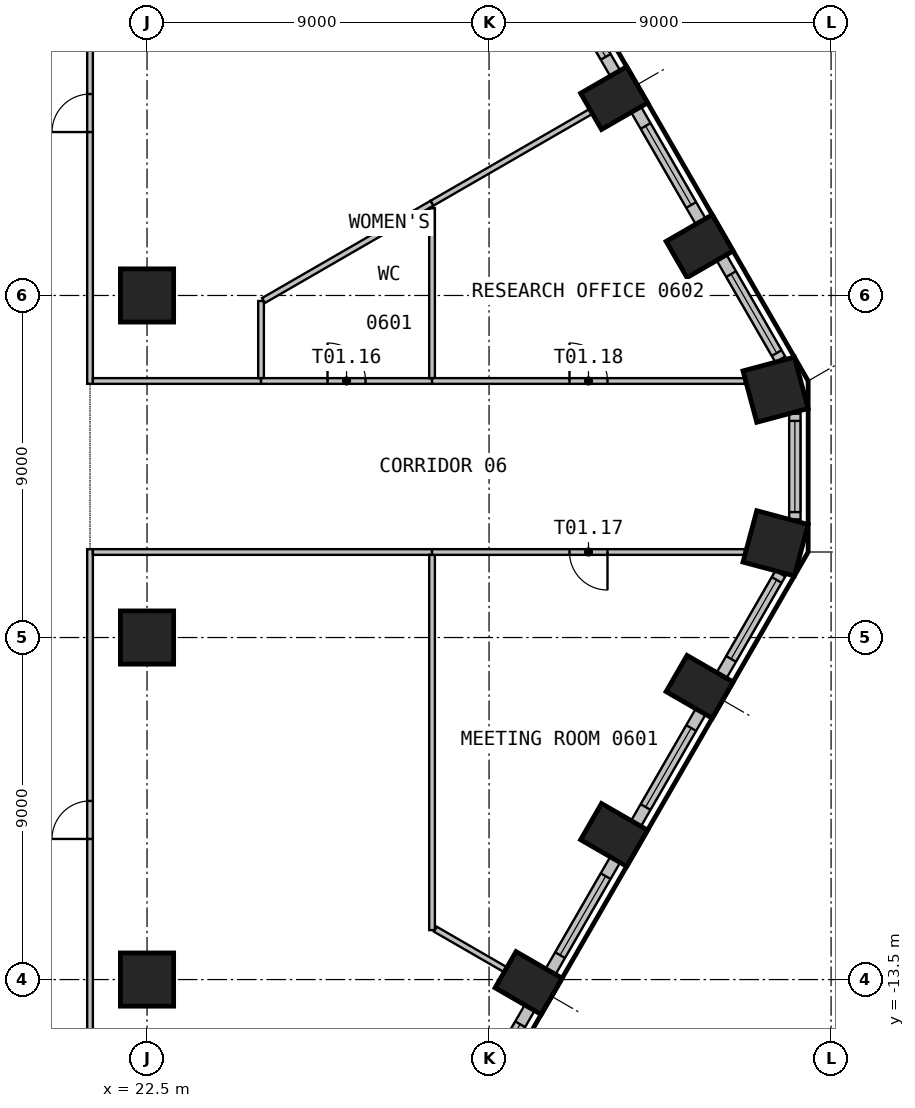
"""IFC4 building model, lengths in metres.
Left out: names, types, materials, properties, quantities, classifications, styles, units other than length and angle.
Written with IfcOpenShell. Run it as: python <this file> out.ifc"""

import sys

from ifc_helpers import new_model, si_unit, direction, frame, frame_2d, origin, origin_2d, place, context, subcontext, project, spatial, rectangle, circle, extrude, element, fill, save


model = new_model("IFC4")
c1 = context("Model", 3, precision=1e-05, world=origin(), true_north=direction((0.0, 1.0)))
c2 = subcontext(c1, "Body", "Model", "MODEL_VIEW")
j1 = project(units=[si_unit("LENGTHUNIT", "METRE"), si_unit("PLANEANGLEUNIT", "RADIAN")], contexts=[c1])
p1 = place(None, origin())
s1 = spatial("IfcSite", under=j1, at=p1, CompositionType="ELEMENT")
p2 = place(p1, origin())
s2 = spatial("IfcBuilding", under=s1, at=p2, CompositionType="ELEMENT")
p3 = place(p2, frame((0.0, 0.0, 30.0)))
s3 = spatial("IfcBuildingStorey", under=s2, at=p3, CompositionType="ELEMENT", Elevation=30.0)
for number, where, z_axis, x_axis in (
    (1, (32.541, -13.591, 0.0), (0.0, 0.0, 1.0), (0.5, 0.866, 0.0)),
    (2, (34.791, -9.694, 0.0), (0.0, 0.0, 1.0), (0.5, 0.866, 0.0)),
    (3, (37.041, -5.797, 0.0), (0.0, 0.0, 1.0), (0.5, 0.866, 0.0)),
):
    element("IfcColumn", number, at=place(p3, frame(where, z_axis=z_axis, x_axis=x_axis)), inside=s3, PredefinedType="COLUMN", context=c2, shape_type="SweptSolid", body=[
        extrude(rectangle(XDim=1.1, YDim=1.4, at=origin_2d()), origin(), (0.0, 0.0, 1.0), 3.525),
    ])
for number, where, z_axis, x_axis in (
    (4, (39.04, -2.02, 0.0), (0.0, 0.0, 1.0), (0.259, 0.966, 0.0)),
    (5, (39.04, 2.02, 0.0), (0.0, 0.0, 1.0), (-0.259, 0.966, 0.0)),
):
    element("IfcColumn", number, at=place(p3, frame(where, z_axis=z_axis, x_axis=x_axis)), inside=s3, PredefinedType="COLUMN", context=c2, shape_type="SweptSolid", body=[
        extrude(rectangle(XDim=1.4, YDim=1.4, at=origin_2d()), origin(), (0.0, 0.0, 1.0), 3.525),
    ])
for number, where, z_axis, x_axis in (
    (6, (37.041, 5.797, 0.0), (0.0, 0.0, 1.0), (-0.5, 0.866, 0.0)),
    (7, (34.791, 9.694, 0.0), (0.0, 0.0, 1.0), (-0.5, 0.866, 0.0)),
):
    element("IfcColumn", number, at=place(p3, frame(where, z_axis=z_axis, x_axis=x_axis)), inside=s3, PredefinedType="COLUMN", context=c2, shape_type="SweptSolid", body=[
        extrude(rectangle(XDim=1.1, YDim=1.4, at=origin_2d()), origin(), (0.0, 0.0, 1.0), 3.525),
    ])
for number, where, z_axis, x_axis in (
    (8, (22.5, -13.5, 0.0), (0.0, 0.0, 1.0), (1.0, 0.0, 0.0)),
    (9, (22.5, -4.5, 0.0), (0.0, 0.0, 1.0), (1.0, 0.0, 0.0)),
    (10, (22.5, 4.5, 0.0), (0.0, 0.0, 1.0), (1.0, 0.0, 0.0)),
):
    element("IfcColumn", number, at=place(p3, frame(where, z_axis=z_axis, x_axis=x_axis)), inside=s3, PredefinedType="COLUMN", context=c2, shape_type="SweptSolid", body=[
        extrude(circle(Radius=0.7, at=origin_2d()), origin(), (0.0, 0.0, 1.0), 3.525),
    ])
p4 = place(p3, frame((30.869, -17.187, 0.0), z_axis=(0.0, 0.0, 1.0), x_axis=(0.499993955907, 0.866028893315, 0.0)))
e11 = element("IfcWall", 11, at=p4, inside=s3, PredefinedType="SOLIDWALL", context=c2, shape_type="SweptSolid", body=[
    extrude(rectangle(XDim=3.399, YDim=0.3, at=frame_2d((1.699, 0.0))), origin(), (0.0, 0.0, 1.0), 3.525),
])
p5 = place(p4, frame((0.5, 0.0, 0.9)))
e12 = element("IfcOpeningElement", 12, at=p5, cuts=e11, PredefinedType="OPENING", context=c2, shape_type="SweptSolid", body=[
    extrude(rectangle(XDim=2.4, YDim=2.1, at=frame_2d((1.2, 1.05))), frame((0.0, 0.16, 0.0), z_axis=(0.0, -1.0, 0.0), x_axis=(1.0, 0.0, 0.0)), (0.0, 0.0, 1.0), 0.32),
])
p6 = place(p3, frame((33.119, -13.29, 0.0), z_axis=(0.0, 0.0, 1.0), x_axis=(0.499993955907, 0.866028893315, 0.0)))
e13 = element("IfcWall", 13, at=p6, inside=s3, PredefinedType="SOLIDWALL", context=c2, shape_type="SweptSolid", body=[
    extrude(rectangle(XDim=3.399, YDim=0.3, at=frame_2d((1.699, 0.0))), origin(), (0.0, 0.0, 1.0), 3.525),
])
p7 = place(p6, frame((0.5, 0.0, 0.9)))
e14 = element("IfcOpeningElement", 14, at=p7, cuts=e13, PredefinedType="OPENING", context=c2, shape_type="SweptSolid", body=[
    extrude(rectangle(XDim=2.4, YDim=2.1, at=frame_2d((1.2, 1.05))), frame((0.0, 0.16, 0.0), z_axis=(0.0, -1.0, 0.0), x_axis=(1.0, 0.0, 0.0)), (0.0, 0.0, 1.0), 0.32),
])
p8 = place(p3, frame((35.369, -9.393, 0.0), z_axis=(0.0, 0.0, 1.0), x_axis=(0.499993955907, 0.866028893315, 0.0)))
e15 = element("IfcWall", 15, at=p8, inside=s3, PredefinedType="SOLIDWALL", context=c2, shape_type="SweptSolid", body=[
    extrude(rectangle(XDim=3.399, YDim=0.3, at=frame_2d((1.699, 0.0))), origin(), (0.0, 0.0, 1.0), 3.525),
])
p9 = place(p8, frame((0.5, 0.0, 0.9)))
e16 = element("IfcOpeningElement", 16, at=p9, cuts=e15, PredefinedType="OPENING", context=c2, shape_type="SweptSolid", body=[
    extrude(rectangle(XDim=2.4, YDim=2.1, at=frame_2d((1.2, 1.05))), frame((0.0, 0.16, 0.0), z_axis=(0.0, -1.0, 0.0), x_axis=(1.0, 0.0, 0.0)), (0.0, 0.0, 1.0), 0.32),
])
p10 = place(p3, frame((37.619, -5.495, 0.0), z_axis=(0.0, 0.0, 1.0), x_axis=(0.49997090907, 0.866042198789, 0.0)))
e17 = element("IfcWall", 17, at=p10, inside=s3, PredefinedType="SOLIDWALL", context=c2, shape_type="SweptSolid", body=[
    extrude(rectangle(XDim=3.091, YDim=0.3, at=frame_2d((1.545, 0.0))), origin(), (0.0, 0.0, 1.0), 3.525),
])
p11 = place(p10, frame((0.5, 0.0, 0.9)))
e18 = element("IfcOpeningElement", 18, at=p11, cuts=e17, PredefinedType="OPENING", context=c2, shape_type="SweptSolid", body=[
    extrude(rectangle(XDim=2.4, YDim=2.1, at=frame_2d((1.2, 1.05))), frame((0.0, 0.16, 0.0), z_axis=(0.0, -1.0, 0.0), x_axis=(1.0, 0.0, 0.0)), (0.0, 0.0, 1.0), 0.32),
])
p12 = place(p3, frame((39.547, -1.391, 0.0), z_axis=(0.0, 0.0, 1.0), x_axis=(0.0, 1.0, 0.0)))
e19 = element("IfcWall", 19, at=p12, inside=s3, PredefinedType="SOLIDWALL", context=c2, shape_type="SweptSolid", body=[
    extrude(rectangle(XDim=2.782, YDim=0.3, at=frame_2d((1.391, 0.0))), origin(), (0.0, 0.0, 1.0), 3.525),
])
p13 = place(p12, frame((0.191, 0.0, 0.9)))
e20 = element("IfcOpeningElement", 20, at=p13, cuts=e19, PredefinedType="OPENING", context=c2, shape_type="SweptSolid", body=[
    extrude(rectangle(XDim=2.4, YDim=2.1, at=frame_2d((1.2, 1.05))), frame((0.0, 0.16, 0.0), z_axis=(0.0, -1.0, 0.0), x_axis=(1.0, 0.0, 0.0)), (0.0, 0.0, 1.0), 0.32),
])
p14 = place(p3, frame((39.165, 2.819, 0.0), z_axis=(0.0, 0.0, 1.0), x_axis=(-0.49997090907, 0.866042198789, 0.0)))
e21 = element("IfcWall", 21, at=p14, inside=s3, PredefinedType="SOLIDWALL", context=c2, shape_type="SweptSolid", body=[
    extrude(rectangle(XDim=3.091, YDim=0.3, at=frame_2d((1.545, 0.0))), origin(), (0.0, 0.0, 1.0), 3.525),
])
p15 = place(p14, frame((0.191, 0.0, 0.9)))
e22 = element("IfcOpeningElement", 22, at=p15, cuts=e21, PredefinedType="OPENING", context=c2, shape_type="SweptSolid", body=[
    extrude(rectangle(XDim=2.4, YDim=2.1, at=frame_2d((1.2, 1.05))), frame((0.0, 0.16, 0.0), z_axis=(0.0, -1.0, 0.0), x_axis=(1.0, 0.0, 0.0)), (0.0, 0.0, 1.0), 0.32),
])
p16 = place(p3, frame((37.069, 6.449, 0.0), z_axis=(0.0, 0.0, 1.0), x_axis=(-0.499993955907, 0.866028893315, 0.0)))
e23 = element("IfcWall", 23, at=p16, inside=s3, PredefinedType="SOLIDWALL", context=c2, shape_type="SweptSolid", body=[
    extrude(rectangle(XDim=3.399, YDim=0.3, at=frame_2d((1.699, 0.0))), origin(), (0.0, 0.0, 1.0), 3.525),
])
p17 = place(p16, frame((0.5, 0.0, 0.9)))
e24 = element("IfcOpeningElement", 24, at=p17, cuts=e23, PredefinedType="OPENING", context=c2, shape_type="SweptSolid", body=[
    extrude(rectangle(XDim=2.4, YDim=2.1, at=frame_2d((1.2, 1.05))), frame((0.0, 0.16, 0.0), z_axis=(0.0, -1.0, 0.0), x_axis=(1.0, 0.0, 0.0)), (0.0, 0.0, 1.0), 0.32),
])
p18 = place(p3, frame((34.819, 10.346, 0.0), z_axis=(0.0, 0.0, 1.0), x_axis=(-0.499993955907, 0.866028893315, 0.0)))
e25 = element("IfcWall", 25, at=p18, inside=s3, PredefinedType="SOLIDWALL", context=c2, shape_type="SweptSolid", body=[
    extrude(rectangle(XDim=3.399, YDim=0.3, at=frame_2d((1.699, 0.0))), origin(), (0.0, 0.0, 1.0), 3.525),
])
p19 = place(p18, frame((0.5, 0.0, 0.9)))
e26 = element("IfcOpeningElement", 26, at=p19, cuts=e25, PredefinedType="OPENING", context=c2, shape_type="SweptSolid", body=[
    extrude(rectangle(XDim=2.4, YDim=2.1, at=frame_2d((1.2, 1.05))), frame((0.0, 0.16, 0.0), z_axis=(0.0, -1.0, 0.0), x_axis=(1.0, 0.0, 0.0)), (0.0, 0.0, 1.0), 0.32),
])
p20 = place(p3, frame((21.0, -16.425, 0.0), z_axis=(0.0, 0.0, 1.0), x_axis=(0.0, 1.0, 0.0)))
e27 = element("IfcWall", 27, at=p20, inside=s3, PredefinedType="PARTITIONING", context=c2, shape_type="SweptSolid", body=[
    extrude(rectangle(XDim=14.25, YDim=0.15, at=frame_2d((7.125, 0.0))), origin(), (0.0, 0.0, 1.0), 3.525),
])
p21 = place(p20, frame((6.625, 0.0, 0.0)))
e28 = element("IfcOpeningElement", 28, at=p21, cuts=e27, PredefinedType="OPENING", context=c2, shape_type="SweptSolid", body=[
    extrude(rectangle(XDim=1.0, YDim=2.1, at=frame_2d((0.5, 1.05))), frame((0.0, 0.085, 0.0), z_axis=(0.0, -1.0, 0.0), x_axis=(1.0, 0.0, 0.0)), (0.0, 0.0, 1.0), 0.17),
])
p22 = place(p3, frame((30.0, -2.25, 0.0), z_axis=(0.0, 0.0, 1.0), x_axis=(-1.0, 0.0, 0.0)))
e29 = element("IfcWall", 29, at=p22, inside=s3, PredefinedType="PARTITIONING", context=c2, shape_type="SweptSolid", body=[
    extrude(rectangle(XDim=8.925, YDim=0.15, at=frame_2d((4.462, 0.0))), origin(), (0.0, 0.0, 1.0), 3.525),
])
p23 = place(p3, frame((21.0, 2.175, 0.0), z_axis=(0.0, 0.0, 1.0), x_axis=(0.0, 1.0, 0.0)))
e30 = element("IfcWall", 30, at=p23, inside=s3, PredefinedType="PARTITIONING", context=c2, shape_type="SweptSolid", body=[
    extrude(rectangle(XDim=14.25, YDim=0.15, at=frame_2d((7.125, 0.0))), origin(), (0.0, 0.0, 1.0), 3.525),
])
p24 = place(p23, frame((6.625, 0.0, 0.0)))
e31 = element("IfcOpeningElement", 31, at=p24, cuts=e30, PredefinedType="OPENING", context=c2, shape_type="SweptSolid", body=[
    extrude(rectangle(XDim=1.0, YDim=2.1, at=frame_2d((0.5, 1.05))), frame((0.0, 0.085, 0.0), z_axis=(0.0, -1.0, 0.0), x_axis=(1.0, 0.0, 0.0)), (0.0, 0.0, 1.0), 0.17),
])
p25 = place(p3, frame((21.075, 2.25, 0.0), z_axis=(0.0, 0.0, 1.0), x_axis=(1.0, 0.0, 0.0)))
e32 = element("IfcWall", 32, at=p25, inside=s3, PredefinedType="PARTITIONING", context=c2, shape_type="SweptSolid", body=[
    extrude(rectangle(XDim=4.425, YDim=0.15, at=frame_2d((2.212, 0.0))), origin(), (0.0, 0.0, 1.0), 3.525),
])
p26 = place(p3, frame((25.5, 4.355, 0.0), z_axis=(0.0, 0.0, 1.0), x_axis=(0.0, -1.0, 0.0)))
e33 = element("IfcWall", 33, at=p26, inside=s3, PredefinedType="PARTITIONING", context=c2, shape_type="SweptSolid", body=[
    extrude(rectangle(XDim=2.03, YDim=0.15, at=frame_2d((1.015, 0.0))), origin(), (0.0, 0.0, 1.0), 3.525),
])
p27 = place(p3, frame((25.5, 2.25, 0.0), z_axis=(0.0, 0.0, 1.0), x_axis=(1.0, 0.0, 0.0)))
e34 = element("IfcWall", 34, at=p27, inside=s3, PredefinedType="PARTITIONING", context=c2, shape_type="SweptSolid", body=[
    extrude(rectangle(XDim=4.5, YDim=0.15, at=frame_2d((2.25, 0.0))), origin(), (0.0, 0.0, 1.0), 3.525),
])
p28 = place(p27, frame((1.75, 0.0, 0.0)))
e35 = element("IfcOpeningElement", 35, at=p28, cuts=e34, PredefinedType="OPENING", context=c2, shape_type="SweptSolid", body=[
    extrude(rectangle(XDim=1.0, YDim=2.1, at=frame_2d((0.5, 1.05))), frame((0.0, 0.085, 0.0), z_axis=(0.0, -1.0, 0.0), x_axis=(1.0, 0.0, 0.0)), (0.0, 0.0, 1.0), 0.17),
])
p29 = place(p3, frame((30.0, 6.928, 0.0), z_axis=(0.0, 0.0, 1.0), x_axis=(-0.866028396804, -0.499994815902, 0.0)))
e36 = element("IfcWall", 36, at=p29, inside=s3, PredefinedType="PARTITIONING", context=c2, shape_type="SweptSolid", body=[
    extrude(rectangle(XDim=5.121, YDim=0.15, at=frame_2d((2.561, 0.0))), origin(), (0.0, 0.0, 1.0), 3.525),
])
p30 = place(p3, frame((30.0, -2.325, 0.0), z_axis=(0.0, 0.0, 1.0), x_axis=(0.0, -1.0, 0.0)))
e37 = element("IfcWall", 37, at=p30, inside=s3, PredefinedType="PARTITIONING", context=c2, shape_type="SweptSolid", body=[
    extrude(rectangle(XDim=9.874, YDim=0.15, at=frame_2d((4.937, 0.0))), origin(), (0.0, 0.0, 1.0), 3.525),
])
p31 = place(p3, frame((30.087, -12.174, 0.0), z_axis=(0.0, 0.0, 1.0), x_axis=(0.866002883922, -0.500039003518, 0.0)))
e38 = element("IfcWall", 38, at=p31, inside=s3, PredefinedType="PARTITIONING", context=c2, shape_type="SweptSolid", body=[
    extrude(rectangle(XDim=2.114, YDim=0.15, at=frame_2d((1.057, 0.0))), origin(), (0.0, 0.0, 1.0), 3.525),
])
p32 = place(p3, frame((38.233, -2.25, 0.0), z_axis=(0.0, 0.0, 1.0), x_axis=(-1.0, 0.0, 0.0)))
e39 = element("IfcWall", 39, at=p32, inside=s3, PredefinedType="PARTITIONING", context=c2, shape_type="SweptSolid", body=[
    extrude(rectangle(XDim=8.233, YDim=0.15, at=frame_2d((4.116, 0.0))), origin(), (0.0, 0.0, 1.0), 3.525),
])
p33 = place(p32, frame((3.616, 0.0, 0.0)))
e40 = element("IfcOpeningElement", 40, at=p33, cuts=e39, PredefinedType="OPENING", context=c2, shape_type="SweptSolid", body=[
    extrude(rectangle(XDim=1.0, YDim=2.1, at=frame_2d((0.5, 1.05))), frame((0.0, 0.085, 0.0), z_axis=(0.0, -1.0, 0.0), x_axis=(1.0, 0.0, 0.0)), (0.0, 0.0, 1.0), 0.17),
])
p34 = place(p3, frame((30.0, 6.798, 0.0), z_axis=(0.0, 0.0, 1.0), x_axis=(0.0, -1.0, 0.0)))
e41 = element("IfcWall", 41, at=p34, inside=s3, PredefinedType="PARTITIONING", context=c2, shape_type="SweptSolid", body=[
    extrude(rectangle(XDim=4.473, YDim=0.15, at=frame_2d((2.237, 0.0))), origin(), (0.0, 0.0, 1.0), 3.525),
])
p35 = place(p3, frame((30.0, 2.25, 0.0), z_axis=(0.0, 0.0, 1.0), x_axis=(1.0, 0.0, 0.0)))
e42 = element("IfcWall", 42, at=p35, inside=s3, PredefinedType="PARTITIONING", context=c2, shape_type="SweptSolid", body=[
    extrude(rectangle(XDim=8.233, YDim=0.15, at=frame_2d((4.116, 0.0))), origin(), (0.0, 0.0, 1.0), 3.525),
])
p36 = place(p35, frame((3.616, 0.0, 0.0)))
e43 = element("IfcOpeningElement", 43, at=p36, cuts=e42, PredefinedType="OPENING", context=c2, shape_type="SweptSolid", body=[
    extrude(rectangle(XDim=1.0, YDim=2.1, at=frame_2d((0.5, 1.05))), frame((0.0, 0.085, 0.0), z_axis=(0.0, -1.0, 0.0), x_axis=(1.0, 0.0, 0.0)), (0.0, 0.0, 1.0), 0.17),
])
p37 = place(p3, frame((34.167, 9.334, 0.0), z_axis=(0.0, 0.0, 1.0), x_axis=(-0.866011543723, -0.500024005562, 0.0)))
e44 = element("IfcWall", 44, at=p37, inside=s3, PredefinedType="PARTITIONING", context=c2, shape_type="SweptSolid", body=[
    extrude(rectangle(XDim=4.812, YDim=0.15, at=frame_2d((2.406, 0.0))), origin(), (0.0, 0.0, 1.0), 3.525),
])
p38 = place(p5, origin())
e45 = element("IfcWindow", 45, at=p38, inside=s3, PartitioningType="SINGLE_PANEL", PredefinedType="WINDOW", context=c2, shape_type="SweptSolid", body=[
    extrude(rectangle(XDim=2.4, YDim=2.1, at=frame_2d((1.2, 1.05))), frame((0.0, 0.03, 0.0), z_axis=(0.0, -1.0, 0.0), x_axis=(1.0, 0.0, 0.0)), (0.0, 0.0, 1.0), 0.06),
])
fill(e12, e45)
p39 = place(p7, origin())
e46 = element("IfcWindow", 46, at=p39, inside=s3, PartitioningType="SINGLE_PANEL", PredefinedType="WINDOW", context=c2, shape_type="SweptSolid", body=[
    extrude(rectangle(XDim=2.4, YDim=2.1, at=frame_2d((1.2, 1.05))), frame((0.0, 0.03, 0.0), z_axis=(0.0, -1.0, 0.0), x_axis=(1.0, 0.0, 0.0)), (0.0, 0.0, 1.0), 0.06),
])
fill(e14, e46)
p40 = place(p9, origin())
e47 = element("IfcWindow", 47, at=p40, inside=s3, PartitioningType="SINGLE_PANEL", PredefinedType="WINDOW", context=c2, shape_type="SweptSolid", body=[
    extrude(rectangle(XDim=2.4, YDim=2.1, at=frame_2d((1.2, 1.05))), frame((0.0, 0.03, 0.0), z_axis=(0.0, -1.0, 0.0), x_axis=(1.0, 0.0, 0.0)), (0.0, 0.0, 1.0), 0.06),
])
fill(e16, e47)
p41 = place(p11, origin())
e48 = element("IfcWindow", 48, at=p41, inside=s3, PartitioningType="SINGLE_PANEL", PredefinedType="WINDOW", context=c2, shape_type="SweptSolid", body=[
    extrude(rectangle(XDim=2.4, YDim=2.1, at=frame_2d((1.2, 1.05))), frame((0.0, 0.03, 0.0), z_axis=(0.0, -1.0, 0.0), x_axis=(1.0, 0.0, 0.0)), (0.0, 0.0, 1.0), 0.06),
])
fill(e18, e48)
p42 = place(p13, origin())
e49 = element("IfcWindow", 49, at=p42, inside=s3, PartitioningType="SINGLE_PANEL", PredefinedType="WINDOW", context=c2, shape_type="SweptSolid", body=[
    extrude(rectangle(XDim=2.4, YDim=2.1, at=frame_2d((1.2, 1.05))), frame((0.0, 0.03, 0.0), z_axis=(0.0, -1.0, 0.0), x_axis=(1.0, 0.0, 0.0)), (0.0, 0.0, 1.0), 0.06),
])
fill(e20, e49)
p43 = place(p15, origin())
e50 = element("IfcWindow", 50, at=p43, inside=s3, PartitioningType="SINGLE_PANEL", PredefinedType="WINDOW", context=c2, shape_type="SweptSolid", body=[
    extrude(rectangle(XDim=2.4, YDim=2.1, at=frame_2d((1.2, 1.05))), frame((0.0, 0.03, 0.0), z_axis=(0.0, -1.0, 0.0), x_axis=(1.0, 0.0, 0.0)), (0.0, 0.0, 1.0), 0.06),
])
fill(e22, e50)
p44 = place(p17, origin())
e51 = element("IfcWindow", 51, at=p44, inside=s3, PartitioningType="SINGLE_PANEL", PredefinedType="WINDOW", context=c2, shape_type="SweptSolid", body=[
    extrude(rectangle(XDim=2.4, YDim=2.1, at=frame_2d((1.2, 1.05))), frame((0.0, 0.03, 0.0), z_axis=(0.0, -1.0, 0.0), x_axis=(1.0, 0.0, 0.0)), (0.0, 0.0, 1.0), 0.06),
])
fill(e24, e51)
p45 = place(p19, origin())
e52 = element("IfcWindow", 52, at=p45, inside=s3, PartitioningType="SINGLE_PANEL", PredefinedType="WINDOW", context=c2, shape_type="SweptSolid", body=[
    extrude(rectangle(XDim=2.4, YDim=2.1, at=frame_2d((1.2, 1.05))), frame((0.0, 0.03, 0.0), z_axis=(0.0, -1.0, 0.0), x_axis=(1.0, 0.0, 0.0)), (0.0, 0.0, 1.0), 0.06),
])
fill(e26, e52)
p46 = place(p21, origin())
e53 = element("IfcDoor", 53, at=p46, inside=s3, OperationType="SINGLE_SWING_RIGHT", PredefinedType="DOOR", context=c2, shape_type="SweptSolid", body=[
    extrude(rectangle(XDim=1.0, YDim=2.1, at=frame_2d((0.5, 1.05))), frame((0.0, 0.025, 0.0), z_axis=(0.0, -1.0, 0.0), x_axis=(1.0, 0.0, 0.0)), (0.0, 0.0, 1.0), 0.05),
])
fill(e28, e53)
p47 = place(p24, origin())
e54 = element("IfcDoor", 54, at=p47, inside=s3, OperationType="SINGLE_SWING_LEFT", PredefinedType="DOOR", context=c2, shape_type="SweptSolid", body=[
    extrude(rectangle(XDim=1.0, YDim=2.1, at=frame_2d((0.5, 1.05))), frame((0.0, 0.025, 0.0), z_axis=(0.0, -1.0, 0.0), x_axis=(1.0, 0.0, 0.0)), (0.0, 0.0, 1.0), 0.05),
])
fill(e31, e54)
p48 = place(p28, origin())
e55 = element("IfcDoor", 55, at=p48, inside=s3, OperationType="SINGLE_SWING_RIGHT", PredefinedType="DOOR", context=c2, shape_type="SweptSolid", body=[
    extrude(rectangle(XDim=1.0, YDim=2.1, at=frame_2d((0.5, 1.05))), frame((0.0, 0.025, 0.0), z_axis=(0.0, -1.0, 0.0), x_axis=(1.0, 0.0, 0.0)), (0.0, 0.0, 1.0), 0.05),
])
fill(e35, e55)
p49 = place(p33, origin())
e56 = element("IfcDoor", 56, at=p49, inside=s3, OperationType="SINGLE_SWING_LEFT", PredefinedType="DOOR", context=c2, shape_type="SweptSolid", body=[
    extrude(rectangle(XDim=1.0, YDim=2.1, at=frame_2d((0.5, 1.05))), frame((0.0, 0.025, 0.0), z_axis=(0.0, -1.0, 0.0), x_axis=(1.0, 0.0, 0.0)), (0.0, 0.0, 1.0), 0.05),
])
fill(e40, e56)
p50 = place(p36, origin())
e57 = element("IfcDoor", 57, at=p50, inside=s3, OperationType="SINGLE_SWING_RIGHT", PredefinedType="DOOR", context=c2, shape_type="SweptSolid", body=[
    extrude(rectangle(XDim=1.0, YDim=2.1, at=frame_2d((0.5, 1.05))), frame((0.0, 0.025, 0.0), z_axis=(0.0, -1.0, 0.0), x_axis=(1.0, 0.0, 0.0)), (0.0, 0.0, 1.0), 0.05),
])
fill(e43, e57)
save(model, sys.argv[1])
